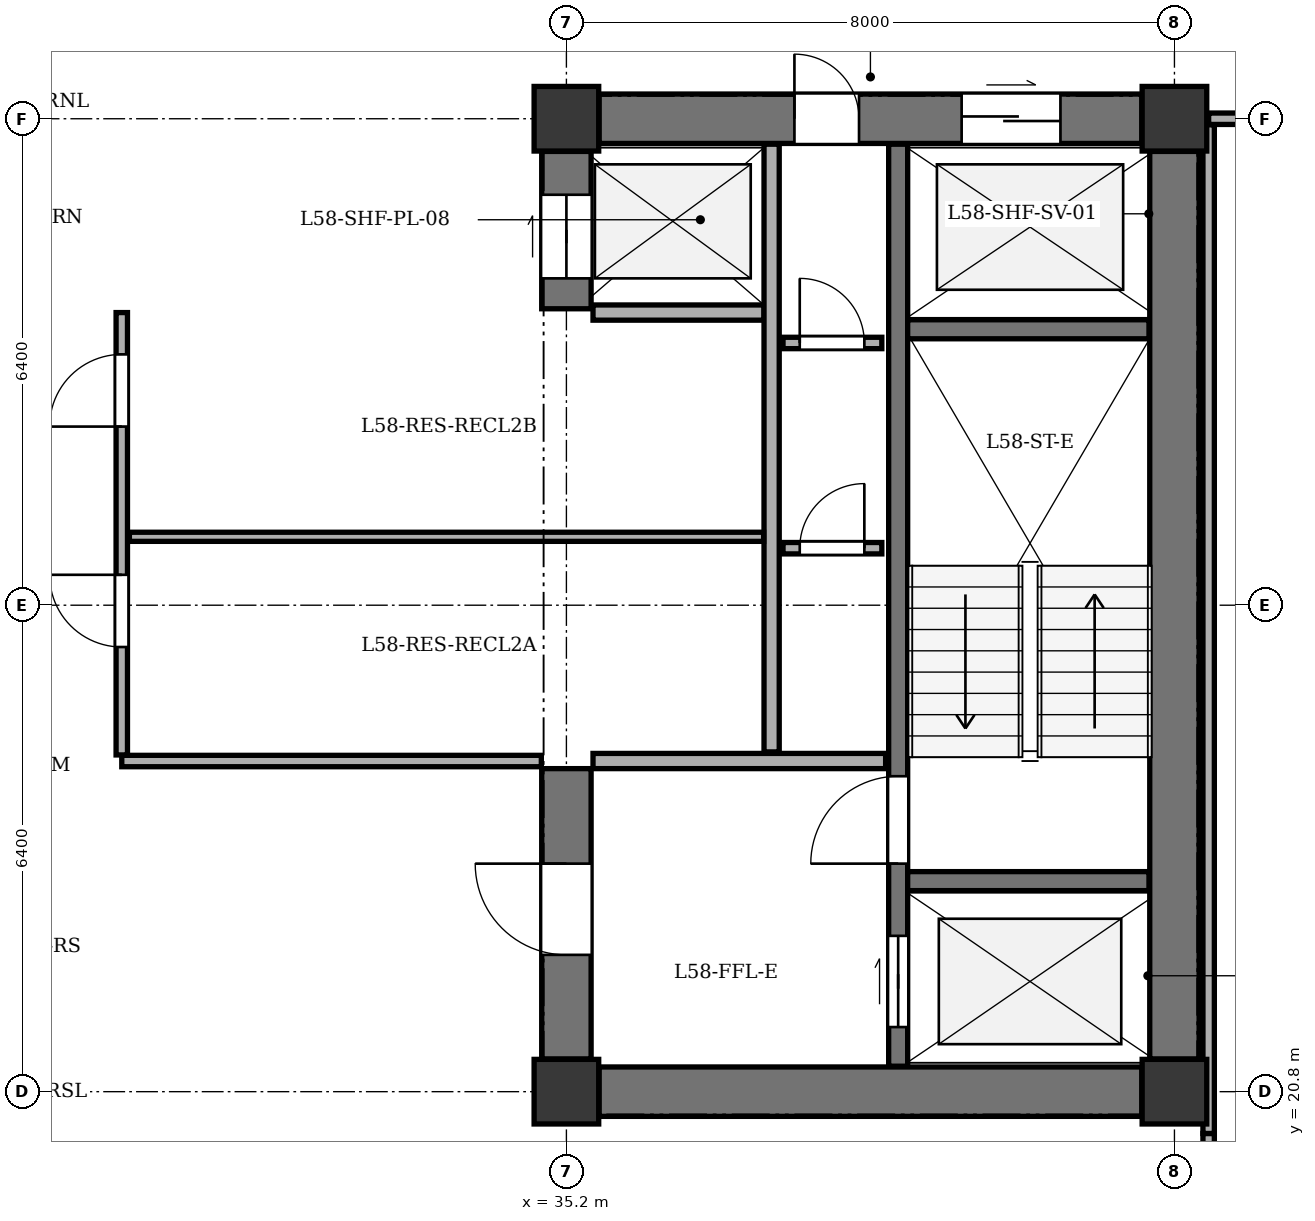
"""IFC4 building model, lengths in metres.
Left out: names, types, materials, properties, quantities, classifications, styles, units other than length and angle.
Written with IfcOpenShell. Run it as: python <this file> out.ifc"""

import sys

from ifc_helpers import new_model, si_unit, direction, frame, frame_2d, origin, origin_2d, place, context, subcontext, project, spatial, rectangle, extrude, element, fill, save


model = new_model("IFC4")
c1 = context("Model", 3, precision=1e-05, world=origin(), true_north=direction((0.0, 1.0)))
c2 = subcontext(c1, "Body", "Model", "MODEL_VIEW")
j1 = project(units=[si_unit("LENGTHUNIT", "METRE"), si_unit("PLANEANGLEUNIT", "RADIAN")], contexts=[c1])
p1 = place(None, origin())
s1 = spatial("IfcSite", under=j1, at=p1, CompositionType="ELEMENT")
p2 = place(p1, origin())
s2 = spatial("IfcBuilding", under=s1, at=p2, CompositionType="ELEMENT")
p3 = place(p2, frame((0.0, 0.0, 224.5)))
s3 = spatial("IfcBuildingStorey", under=s2, at=p3, CompositionType="ELEMENT", Elevation=224.5)
for number, where, z_axis, x_axis in (
    (1, (35.2, 20.8, 0.0), (0.0, 0.0, 1.0), (1.0, 0.0, 0.0)),
    (2, (43.2, 20.8, 0.0), (0.0, 0.0, 1.0), (1.0, 0.0, 0.0)),
    (3, (35.2, 33.6, 0.0), (0.0, 0.0, 1.0), (1.0, 0.0, 0.0)),
    (4, (43.2, 33.6, 0.0), (0.0, 0.0, 1.0), (1.0, 0.0, 0.0)),
):
    element("IfcColumn", number, at=place(p3, frame(where, z_axis=z_axis, x_axis=x_axis)), inside=s3, PredefinedType="COLUMN", context=c2, shape_type="SweptSolid", body=[
        extrude(rectangle(XDim=0.85, YDim=0.85, at=origin_2d()), origin(), (0.0, 0.0, 1.0), 3.4),
    ])
p4 = place(p3, frame((43.2, 21.23, 0.0), z_axis=(0.0, 0.0, 1.0), x_axis=(0.0, 1.0, 0.0)))
e5 = element("IfcWall", 5, at=p4, inside=s3, PredefinedType="SHEAR", context=c2, shape_type="SweptSolid", body=[
    extrude(rectangle(XDim=11.94, YDim=0.65, at=frame_2d((5.97, 0.0))), origin(), (0.0, 0.0, 1.0), 2.95),
])
p5 = place(p3, frame((35.63, 20.8, 0.0), z_axis=(0.0, 0.0, 1.0), x_axis=(1.0, 0.0, 0.0)))
e6 = element("IfcWall", 6, at=p5, inside=s3, PredefinedType="SHEAR", context=c2, shape_type="SweptSolid", body=[
    extrude(rectangle(XDim=7.14, YDim=0.65, at=frame_2d((3.57, 0.0))), origin(), (0.0, 0.0, 1.0), 2.95),
])
p6 = place(p3, frame((35.63, 33.6, 0.0), z_axis=(0.0, 0.0, 1.0), x_axis=(1.0, 0.0, 0.0)))
e7 = element("IfcWall", 7, at=p6, inside=s3, PredefinedType="SHEAR", context=c2, shape_type="SweptSolid", body=[
    extrude(rectangle(XDim=7.14, YDim=0.65, at=frame_2d((3.57, 0.0))), origin(), (0.0, 0.0, 1.0), 2.95),
])
p7 = place(p6, frame((4.77, 0.0, 0.0)))
e8 = element("IfcOpeningElement", 8, at=p7, cuts=e7, PredefinedType="OPENING", context=c2, shape_type="SweptSolid", body=[
    extrude(rectangle(XDim=1.3, YDim=2.15, at=frame_2d((0.65, 1.075))), frame((0.0, 0.335, 0.0), z_axis=(0.0, -1.0, 0.0), x_axis=(1.0, 0.0, 0.0)), (0.0, 0.0, 1.0), 0.67),
])
p8 = place(p6, frame((2.57, 0.0, 0.0)))
e9 = element("IfcOpeningElement", 9, at=p8, cuts=e7, PredefinedType="OPENING", context=c2, shape_type="SweptSolid", body=[
    extrude(rectangle(XDim=0.85, YDim=2.02, at=frame_2d((0.425, 1.01))), frame((0.0, 0.335, 0.0), z_axis=(0.0, -1.0, 0.0), x_axis=(1.0, 0.0, 0.0)), (0.0, 0.0, 1.0), 0.67),
])
p9 = place(p3, frame((35.2, 21.23, 0.0), z_axis=(0.0, 0.0, 1.0), x_axis=(0.0, 1.0, 0.0)))
e10 = element("IfcWall", 10, at=p9, inside=s3, PredefinedType="SHEAR", context=c2, shape_type="SweptSolid", body=[
    extrude(rectangle(XDim=3.82, YDim=0.65, at=frame_2d((1.91, 0.0))), origin(), (0.0, 0.0, 1.0), 2.95),
])
p10 = place(p9, frame((1.37, 0.0, 0.0)))
e11 = element("IfcOpeningElement", 11, at=p10, cuts=e10, PredefinedType="OPENING", context=c2, shape_type="SweptSolid", body=[
    extrude(rectangle(XDim=1.2, YDim=2.15, at=frame_2d((0.6, 1.075))), frame((0.0, 0.335, 0.0), z_axis=(0.0, -1.0, 0.0), x_axis=(1.0, 0.0, 0.0)), (0.0, 0.0, 1.0), 0.67),
])
p11 = place(p3, frame((35.2, 31.1, 0.0), z_axis=(0.0, 0.0, 1.0), x_axis=(0.0, 1.0, 0.0)))
e12 = element("IfcWall", 12, at=p11, inside=s3, PredefinedType="SHEAR", context=c2, shape_type="SweptSolid", body=[
    extrude(rectangle(XDim=2.07, YDim=0.65, at=frame_2d((1.035, 0.0))), origin(), (0.0, 0.0, 1.0), 2.95),
])
p12 = place(p11, frame((0.4, 0.0, 0.0)))
e13 = element("IfcOpeningElement", 13, at=p12, cuts=e12, PredefinedType="OPENING", context=c2, shape_type="SweptSolid", body=[
    extrude(rectangle(XDim=1.1, YDim=2.1, at=frame_2d((0.55, 1.05))), frame((0.0, 0.335, 0.0), z_axis=(0.0, -1.0, 0.0), x_axis=(1.0, 0.0, 0.0)), (0.0, 0.0, 1.0), 0.67),
])
p13 = place(p3, frame((39.565, 21.135, 0.0), z_axis=(0.0, 0.0, 1.0), x_axis=(0.0, 1.0, 0.0)))
e14 = element("IfcWall", 14, at=p13, inside=s3, PredefinedType="SHEAR", context=c2, shape_type="SweptSolid", body=[
    extrude(rectangle(XDim=12.13, YDim=0.25, at=frame_2d((6.065, 0.0))), origin(), (0.0, 0.0, 1.0), 2.95),
])
p14 = place(p13, frame((0.515, 0.0, 0.0)))
e15 = element("IfcOpeningElement", 15, at=p14, cuts=e14, PredefinedType="OPENING", context=c2, shape_type="SweptSolid", body=[
    extrude(rectangle(XDim=1.2, YDim=2.15, at=frame_2d((0.6, 1.075))), frame((0.0, 0.135, 0.0), z_axis=(0.0, -1.0, 0.0), x_axis=(1.0, 0.0, 0.0)), (0.0, 0.0, 1.0), 0.27),
])
p15 = place(p13, frame((2.665, 0.0, 0.0)))
e16 = element("IfcOpeningElement", 16, at=p15, cuts=e14, PredefinedType="OPENING", context=c2, shape_type="SweptSolid", body=[
    extrude(rectangle(XDim=1.15, YDim=2.15, at=frame_2d((0.575, 1.075))), frame((0.0, 0.135, 0.0), z_axis=(0.0, -1.0, 0.0), x_axis=(1.0, 0.0, 0.0)), (0.0, 0.0, 1.0), 0.27),
])
for number, where, z_axis, x_axis in (
    (17, (39.69, 23.57, 0.0), (0.0, 0.0, 1.0), (1.0, 0.0, 0.0)),
    (18, (39.69, 30.83, 0.0), (0.0, 0.0, 1.0), (1.0, 0.0, 0.0)),
):
    element("IfcWall", number, at=place(p3, frame(where, z_axis=z_axis, x_axis=x_axis)), inside=s3, PredefinedType="SHEAR", context=c2, shape_type="SweptSolid", body=[
        extrude(rectangle(XDim=3.175, YDim=0.25, at=frame_2d((1.587, 0.0))), origin(), (0.0, 0.0, 1.0), 2.95),
    ])
p16 = place(p3, frame((35.55, 25.15, 0.0), z_axis=(0.0, 0.0, 1.0), x_axis=(1.0, 0.0, 0.0)))
e19 = element("IfcWall", 19, at=p16, inside=s3, PredefinedType="SOLIDWALL", context=c2, shape_type="SweptSolid", body=[
    extrude(rectangle(XDim=3.85, YDim=0.2, at=frame_2d((1.925, 0.0))), origin(), (0.0, 0.0, 1.0), 2.95),
])
p17 = place(p3, frame((35.55, 31.05, 0.0), z_axis=(0.0, 0.0, 1.0), x_axis=(1.0, 0.0, 0.0)))
e20 = element("IfcWall", 20, at=p17, inside=s3, PredefinedType="SOLIDWALL", context=c2, shape_type="SweptSolid", body=[
    extrude(rectangle(XDim=2.25, YDim=0.2, at=frame_2d((1.125, 0.0))), origin(), (0.0, 0.0, 1.0), 2.95),
])
p18 = place(p3, frame((37.9, 25.27, 0.0), z_axis=(0.0, 0.0, 1.0), x_axis=(0.0, 1.0, 0.0)))
e21 = element("IfcWall", 21, at=p18, inside=s3, PredefinedType="SOLIDWALL", context=c2, shape_type="SweptSolid", body=[
    extrude(rectangle(XDim=7.995, YDim=0.2, at=frame_2d((3.998, 0.0))), origin(), (0.0, 0.0, 1.0), 2.95),
])
p19 = place(p3, frame((38.05, 27.95, 0.0), z_axis=(0.0, 0.0, 1.0), x_axis=(1.0, 0.0, 0.0)))
e22 = element("IfcWall", 22, at=p19, inside=s3, PredefinedType="PARTITIONING", context=c2, shape_type="SweptSolid", body=[
    extrude(rectangle(XDim=1.3, YDim=0.15, at=frame_2d((0.65, 0.0))), origin(), (0.0, 0.0, 1.0), 2.95),
])
p20 = place(p19, frame((0.22, 0.0, 0.0)))
e23 = element("IfcOpeningElement", 23, at=p20, cuts=e22, PredefinedType="OPENING", context=c2, shape_type="SweptSolid", body=[
    extrude(rectangle(XDim=0.85, YDim=2.02, at=frame_2d((0.425, 1.01))), frame((0.0, 0.085, 0.0), z_axis=(0.0, -1.0, 0.0), x_axis=(1.0, 0.0, 0.0)), (0.0, 0.0, 1.0), 0.17),
])
p21 = place(p3, frame((38.05, 30.65, 0.0), z_axis=(0.0, 0.0, 1.0), x_axis=(1.0, 0.0, 0.0)))
e24 = element("IfcWall", 24, at=p21, inside=s3, PredefinedType="PARTITIONING", context=c2, shape_type="SweptSolid", body=[
    extrude(rectangle(XDim=1.3, YDim=0.15, at=frame_2d((0.65, 0.0))), origin(), (0.0, 0.0, 1.0), 2.95),
])
p22 = place(p21, frame((0.22, 0.0, 0.0)))
e25 = element("IfcOpeningElement", 25, at=p22, cuts=e24, PredefinedType="OPENING", context=c2, shape_type="SweptSolid", body=[
    extrude(rectangle(XDim=0.85, YDim=2.02, at=frame_2d((0.425, 1.01))), frame((0.0, 0.085, 0.0), z_axis=(0.0, -1.0, 0.0), x_axis=(1.0, 0.0, 0.0)), (0.0, 0.0, 1.0), 0.17),
])
p23 = place(p3, frame((29.35, 25.15, 0.0), z_axis=(0.0, 0.0, 1.0), x_axis=(1.0, 0.0, 0.0)))
e26 = element("IfcWall", 26, at=p23, inside=s3, PredefinedType="PARTITIONING", context=c2, shape_type="SweptSolid", body=[
    extrude(rectangle(XDim=5.52, YDim=0.15, at=frame_2d((2.76, 0.0))), origin(), (0.0, 0.0, 1.0), 2.95),
])
p24 = place(p3, frame((29.35, 25.23, 0.0), z_axis=(0.0, 0.0, 1.0), x_axis=(0.0, 1.0, 0.0)))
e27 = element("IfcWall", 27, at=p24, inside=s3, PredefinedType="PARTITIONING", context=c2, shape_type="SweptSolid", body=[
    extrude(rectangle(XDim=5.82, YDim=0.15, at=frame_2d((2.91, 0.0))), origin(), (0.0, 0.0, 1.0), 2.95),
])
p25 = place(p24, frame((1.42, 0.0, 0.0)))
e28 = element("IfcOpeningElement", 28, at=p25, cuts=e27, PredefinedType="OPENING", context=c2, shape_type="SweptSolid", body=[
    extrude(rectangle(XDim=0.95, YDim=2.1, at=frame_2d((0.475, 1.05))), frame((0.0, 0.085, 0.0), z_axis=(0.0, -1.0, 0.0), x_axis=(1.0, 0.0, 0.0)), (0.0, 0.0, 1.0), 0.17),
])
p26 = place(p24, frame((4.32, 0.0, 0.0)))
e29 = element("IfcOpeningElement", 29, at=p26, cuts=e27, PredefinedType="OPENING", context=c2, shape_type="SweptSolid", body=[
    extrude(rectangle(XDim=0.95, YDim=2.1, at=frame_2d((0.475, 1.05))), frame((0.0, 0.085, 0.0), z_axis=(0.0, -1.0, 0.0), x_axis=(1.0, 0.0, 0.0)), (0.0, 0.0, 1.0), 0.17),
])
p27 = place(p3, frame((29.45, 28.1, 0.0), z_axis=(0.0, 0.0, 1.0), x_axis=(1.0, 0.0, 0.0)))
e30 = element("IfcWall", 30, at=p27, inside=s3, PredefinedType="PARTITIONING", context=c2, shape_type="SweptSolid", body=[
    extrude(rectangle(XDim=8.345, YDim=0.12, at=frame_2d((4.172, 0.0))), origin(), (0.0, 0.0, 1.0), 2.95),
])
p28 = place(p3, frame((43.65, 33.6, 0.0), z_axis=(0.0, 0.0, 1.0), x_axis=(1.0, 0.0, 0.0)))
e31 = element("IfcWall", 31, at=p28, inside=s3, PredefinedType="PARTITIONING", context=c2, shape_type="SweptSolid", body=[
    extrude(rectangle(XDim=5.305, YDim=0.15, at=frame_2d((2.653, 0.0))), origin(), (0.0, 0.0, 1.0), 2.135),
])
p29 = place(p3, frame((43.65, 18.46, 0.0), z_axis=(0.0, 0.0, 1.0), x_axis=(0.0, 1.0, 0.0)))
e32 = element("IfcWall", 32, at=p29, inside=s3, PredefinedType="PARTITIONING", context=c2, shape_type="SweptSolid", body=[
    extrude(rectangle(XDim=1.79, YDim=0.15, at=frame_2d((0.895, 0.0))), origin(), (0.0, 0.0, 1.0), 2.95),
])
p30 = place(p29, frame((0.38, 0.0, 0.0)))
e33 = element("IfcOpeningElement", 33, at=p30, cuts=e32, PredefinedType="OPENING", context=c2, shape_type="SweptSolid", body=[
    extrude(rectangle(XDim=0.95, YDim=2.1, at=frame_2d((0.475, 1.05))), frame((0.0, 0.085, 0.0), z_axis=(0.0, -1.0, 0.0), x_axis=(1.0, 0.0, 0.0)), (0.0, 0.0, 1.0), 0.17),
])
p31 = place(p3, frame((43.65, 20.25, 0.0), z_axis=(0.0, 0.0, 1.0), x_axis=(0.0, 1.0, 0.0)))
e34 = element("IfcWall", 34, at=p31, inside=s3, PredefinedType="PARTITIONING", context=c2, shape_type="SweptSolid", body=[
    extrude(rectangle(XDim=13.27, YDim=0.15, at=frame_2d((6.635, 0.0))), origin(), (0.0, 0.0, 1.0), 2.95),
])
p32 = place(p7, origin())
e35 = element("IfcDoor", 35, at=p32, inside=s3, OperationType="DOUBLE_DOOR_SLIDING", PredefinedType="DOOR", context=c2, shape_type="SweptSolid", body=[
    extrude(rectangle(XDim=1.3, YDim=2.15, at=frame_2d((0.65, 1.075))), frame((0.0, 0.025, 0.0), z_axis=(0.0, -1.0, 0.0), x_axis=(1.0, 0.0, 0.0)), (0.0, 0.0, 1.0), 0.05),
])
fill(e8, e35)
p33 = place(p8, origin())
e36 = element("IfcDoor", 36, at=p33, inside=s3, OperationType="SINGLE_SWING_LEFT", PredefinedType="DOOR", context=c2, shape_type="SweptSolid", body=[
    extrude(rectangle(XDim=0.85, YDim=2.02, at=frame_2d((0.425, 1.01))), frame((0.0, 0.025, 0.0), z_axis=(0.0, -1.0, 0.0), x_axis=(1.0, 0.0, 0.0)), (0.0, 0.0, 1.0), 0.05),
])
fill(e9, e36)
p34 = place(p10, origin())
e37 = element("IfcDoor", 37, at=p34, inside=s3, OperationType="SINGLE_SWING_RIGHT", PredefinedType="DOOR", context=c2, shape_type="SweptSolid", body=[
    extrude(rectangle(XDim=1.2, YDim=2.15, at=frame_2d((0.6, 1.075))), frame((0.0, 0.025, 0.0), z_axis=(0.0, -1.0, 0.0), x_axis=(1.0, 0.0, 0.0)), (0.0, 0.0, 1.0), 0.05),
])
fill(e11, e37)
p35 = place(p12, origin())
e38 = element("IfcDoor", 38, at=p35, inside=s3, OperationType="DOUBLE_DOOR_SLIDING", PredefinedType="DOOR", context=c2, shape_type="SweptSolid", body=[
    extrude(rectangle(XDim=1.1, YDim=2.1, at=frame_2d((0.55, 1.05))), frame((0.0, 0.025, 0.0), z_axis=(0.0, -1.0, 0.0), x_axis=(1.0, 0.0, 0.0)), (0.0, 0.0, 1.0), 0.05),
])
fill(e13, e38)
p36 = place(p14, origin())
e39 = element("IfcDoor", 39, at=p36, inside=s3, OperationType="DOUBLE_DOOR_SLIDING", PredefinedType="DOOR", context=c2, shape_type="SweptSolid", body=[
    extrude(rectangle(XDim=1.2, YDim=2.15, at=frame_2d((0.6, 1.075))), frame((0.0, 0.025, 0.0), z_axis=(0.0, -1.0, 0.0), x_axis=(1.0, 0.0, 0.0)), (0.0, 0.0, 1.0), 0.05),
])
fill(e15, e39)
p37 = place(p15, origin())
e40 = element("IfcDoor", 40, at=p37, inside=s3, OperationType="SINGLE_SWING_LEFT", PredefinedType="DOOR", context=c2, shape_type="SweptSolid", body=[
    extrude(rectangle(XDim=1.15, YDim=2.15, at=frame_2d((0.575, 1.075))), frame((0.0, 0.025, 0.0), z_axis=(0.0, -1.0, 0.0), x_axis=(1.0, 0.0, 0.0)), (0.0, 0.0, 1.0), 0.05),
])
fill(e16, e40)
p38 = place(p20, origin())
e41 = element("IfcDoor", 41, at=p38, inside=s3, OperationType="SINGLE_SWING_RIGHT", PredefinedType="DOOR", context=c2, shape_type="SweptSolid", body=[
    extrude(rectangle(XDim=0.85, YDim=2.02, at=frame_2d((0.425, 1.01))), frame((0.0, 0.025, 0.0), z_axis=(0.0, -1.0, 0.0), x_axis=(1.0, 0.0, 0.0)), (0.0, 0.0, 1.0), 0.05),
])
fill(e23, e41)
p39 = place(p22, origin())
e42 = element("IfcDoor", 42, at=p39, inside=s3, OperationType="SINGLE_SWING_LEFT", PredefinedType="DOOR", context=c2, shape_type="SweptSolid", body=[
    extrude(rectangle(XDim=0.85, YDim=2.02, at=frame_2d((0.425, 1.01))), frame((0.0, 0.025, 0.0), z_axis=(0.0, -1.0, 0.0), x_axis=(1.0, 0.0, 0.0)), (0.0, 0.0, 1.0), 0.05),
])
fill(e25, e42)
p40 = place(p25, origin())
e43 = element("IfcDoor", 43, at=p40, inside=s3, OperationType="SINGLE_SWING_RIGHT", PredefinedType="DOOR", context=c2, shape_type="SweptSolid", body=[
    extrude(rectangle(XDim=0.95, YDim=2.1, at=frame_2d((0.475, 1.05))), frame((0.0, 0.025, 0.0), z_axis=(0.0, -1.0, 0.0), x_axis=(1.0, 0.0, 0.0)), (0.0, 0.0, 1.0), 0.05),
])
fill(e28, e43)
p41 = place(p26, origin())
e44 = element("IfcDoor", 44, at=p41, inside=s3, OperationType="SINGLE_SWING_LEFT", PredefinedType="DOOR", context=c2, shape_type="SweptSolid", body=[
    extrude(rectangle(XDim=0.95, YDim=2.1, at=frame_2d((0.475, 1.05))), frame((0.0, 0.025, 0.0), z_axis=(0.0, -1.0, 0.0), x_axis=(1.0, 0.0, 0.0)), (0.0, 0.0, 1.0), 0.05),
])
fill(e29, e44)
save(model, sys.argv[1])
